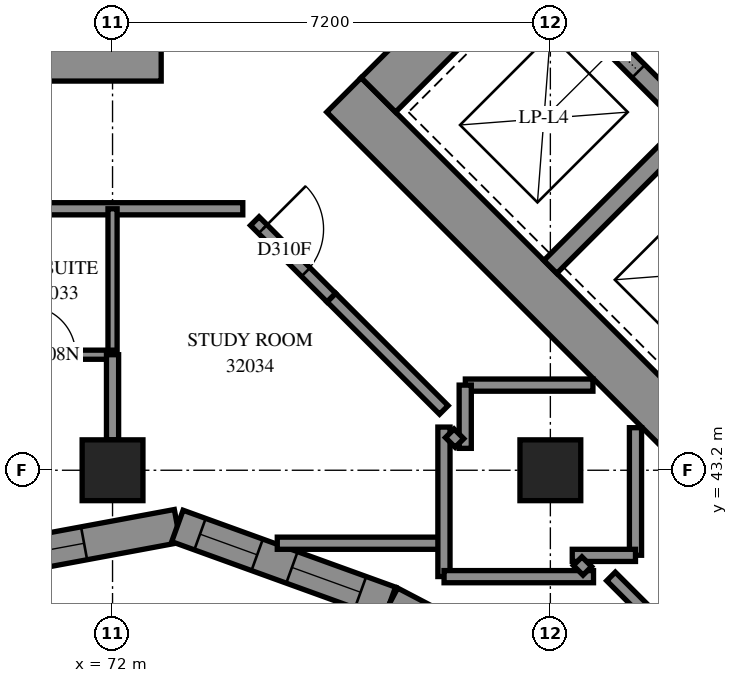
"""IFC4 building model, lengths in metres.
Left out: names, types, materials, properties, quantities, classifications, styles, units other than length and angle.
Written with IfcOpenShell. Run it as: python <this file> out.ifc"""

import sys

from ifc_helpers import new_model, si_unit, direction, frame, frame_2d, origin, origin_2d, place, context, subcontext, project, spatial, polyline, rectangle, outline, extrude, element, fill, save


model = new_model("IFC4")
c1 = context("Model", 3, precision=1e-05, world=origin(), true_north=direction((0.0, 1.0)))
c2 = subcontext(c1, "Body", "Model", "MODEL_VIEW")
j1 = project(units=[si_unit("LENGTHUNIT", "METRE"), si_unit("PLANEANGLEUNIT", "RADIAN")], contexts=[c1])
p1 = place(None, origin())
s1 = spatial("IfcSite", under=j1, at=p1, CompositionType="ELEMENT")
p2 = place(p1, origin())
s2 = spatial("IfcBuilding", under=s1, at=p2, CompositionType="ELEMENT")
p3 = place(p2, frame((0.0, 0.0, 118.6)))
s3 = spatial("IfcBuildingStorey", under=s2, at=p3, CompositionType="ELEMENT", Elevation=118.6)
for number, where, z_axis, x_axis in (
    (1, (72.0, 43.2, 0.0), (0.0, 0.0, 1.0), (1.0, 0.0, 0.0)),
    (2, (79.2, 43.2, 0.0), (0.0, 0.0, 1.0), (1.0, 0.0, 0.0)),
):
    element("IfcColumn", number, at=place(p3, frame(where, z_axis=z_axis, x_axis=x_axis)), inside=s3, PredefinedType="COLUMN", context=c2, shape_type="SweptSolid", body=[
        extrude(rectangle(XDim=1.0, YDim=1.0, at=origin_2d()), origin(), (0.0, 0.0, 1.0), 3.1),
    ])
for number, where, z_axis, x_axis in (
    (3, (56.8, 50.0, -0.3), (0.0, 0.0, 1.0), (1.0, 0.0, 0.0)),
    (4, (75.806, 49.373, -0.3), (0.0, 0.0, 1.0), (0.707, -0.707, 0.0)),
):
    element("IfcWall", number, at=place(p3, frame(where, z_axis=z_axis, x_axis=x_axis)), inside=s3, PredefinedType="SHEAR", context=c2, shape_type="SweptSolid", body=[
        extrude(rectangle(XDim=16.0, YDim=0.8, at=frame_2d((8.0, 0.0))), origin(), (0.0, 0.0, 1.0), 2.7),
    ])
p4 = place(p3, frame((76.372, 49.373, -0.3), z_axis=(0.0, 0.0, 1.0), x_axis=(0.7071067812, 0.7071067812, 0.0)))
e5 = element("IfcWall", 5, at=p4, inside=s3, PredefinedType="SHEAR", context=c2, shape_type="SweptSolid", body=[
    extrude(rectangle(XDim=14.4, YDim=0.8, at=frame_2d((7.2, 0.0))), origin(), (0.0, 0.0, 1.0), 2.7),
])
p5 = place(p4, frame((4.55, 0.0, 0.3)))
e6 = element("IfcOpeningElement", 6, at=p5, cuts=e5, PredefinedType="OPENING", context=c2, shape_type="SweptSolid", body=[
    extrude(rectangle(XDim=1.1, YDim=2.1, at=frame_2d((0.55, 1.05))), frame((0.0, 0.41, 0.0), z_axis=(0.0, -1.0, 0.0), x_axis=(1.0, 0.0, 0.0)), (0.0, 0.0, 1.0), 0.82),
])
p6 = place(p4, frame((11.35, 0.0, 0.3)))
e7 = element("IfcOpeningElement", 7, at=p6, cuts=e5, PredefinedType="OPENING", context=c2, shape_type="SweptSolid", body=[
    extrude(rectangle(XDim=1.1, YDim=2.1, at=frame_2d((0.55, 1.05))), frame((0.0, 0.41, 0.0), z_axis=(0.0, -1.0, 0.0), x_axis=(1.0, 0.0, 0.0)), (0.0, 0.0, 1.0), 0.82),
])
p7 = place(p3, frame((79.2, 46.544, 0.0), z_axis=(0.0, 0.0, 1.0), x_axis=(0.7071219326, 0.7070916295, 0.0)))
e8 = element("IfcWall", 8, at=p7, inside=s3, PredefinedType="SOLIDWALL", context=c2, shape_type="SweptSolid", body=[
    extrude(rectangle(XDim=3.3, YDim=0.3, at=frame_2d((1.65, 0.0))), origin(), (0.0, 0.0, 1.0), 3.1),
])
p8 = place(p3, frame((78.988, 51.423, 0.0), z_axis=(0.0, 0.0, 1.0), x_axis=(0.7071067812, -0.7071067812, 0.0)))
e9 = element("IfcWall", 9, at=p8, inside=s3, PredefinedType="SOLIDWALL", context=c2, shape_type="SweptSolid", body=[
    extrude(rectangle(XDim=14.4, YDim=0.3, at=frame_2d((7.2, 0.0))), origin(), (0.0, 0.0, 1.0), 3.1),
])
p9 = place(p8, frame((1.25, 0.0, 0.0)))
e10 = element("IfcOpeningElement", 10, at=p9, cuts=e9, PredefinedType="OPENING", context=c2, shape_type="SweptSolid", body=[
    extrude(rectangle(XDim=1.1, YDim=2.1, at=frame_2d((0.55, 1.05))), frame((0.0, 0.16, 0.0), z_axis=(0.0, -1.0, 0.0), x_axis=(1.0, 0.0, 0.0)), (0.0, 0.0, 1.0), 0.32),
])
p10 = place(p8, frame((4.85, 0.0, 0.0)))
e11 = element("IfcOpeningElement", 11, at=p10, cuts=e9, PredefinedType="OPENING", context=c2, shape_type="SweptSolid", body=[
    extrude(rectangle(XDim=1.1, YDim=2.1, at=frame_2d((0.55, 1.05))), frame((0.0, 0.16, 0.0), z_axis=(0.0, -1.0, 0.0), x_axis=(1.0, 0.0, 0.0)), (0.0, 0.0, 1.0), 0.32),
])
p11 = place(p8, frame((8.45, 0.0, 0.0)))
e12 = element("IfcOpeningElement", 12, at=p11, cuts=e9, PredefinedType="OPENING", context=c2, shape_type="SweptSolid", body=[
    extrude(rectangle(XDim=1.1, YDim=2.1, at=frame_2d((0.55, 1.05))), frame((0.0, 0.16, 0.0), z_axis=(0.0, -1.0, 0.0), x_axis=(1.0, 0.0, 0.0)), (0.0, 0.0, 1.0), 0.32),
])
p12 = place(p8, frame((12.05, 0.0, 0.0)))
e13 = element("IfcOpeningElement", 13, at=p12, cuts=e9, PredefinedType="OPENING", context=c2, shape_type="SweptSolid", body=[
    extrude(rectangle(XDim=1.1, YDim=2.1, at=frame_2d((0.55, 1.05))), frame((0.0, 0.16, 0.0), z_axis=(0.0, -1.0, 0.0), x_axis=(1.0, 0.0, 0.0)), (0.0, 0.0, 1.0), 0.32),
])
p13 = place(p3, frame((69.637, 41.647, 0.0), z_axis=(0.0, 0.0, 1.0), x_axis=(0.9831675545, 0.1827062117, 0.0)))
e14 = element("IfcWall", 14, at=p13, inside=s3, PredefinedType="SOLIDWALL", context=c2, shape_type="SweptSolid", body=[
    extrude(outline(polyline([(-0.051, -0.275), (3.413, -0.275), (3.563, 0.275), (0.051, 0.275), (-0.051, -0.275)])), origin(), (0.0, 0.0, 1.0), 3.1),
])
p14 = place(p13, frame((0.727, 0.0, 0.5)))
e15 = element("IfcOpeningElement", 15, at=p14, cuts=e14, PredefinedType="OPENING", context=c2, shape_type="SweptSolid", body=[
    extrude(rectangle(XDim=1.2, YDim=2.45, at=frame_2d((0.6, 1.225))), frame((0.0, 0.285, 0.0), z_axis=(0.0, -1.0, 0.0), x_axis=(1.0, 0.0, 0.0)), (0.0, 0.0, 1.0), 0.57),
])
p15 = place(p3, frame((73.067, 42.284, 0.0), z_axis=(0.0, 0.0, 1.0), x_axis=(0.9402976308, -0.3403532953, 0.0)))
e16 = element("IfcWall", 16, at=p15, inside=s3, PredefinedType="SOLIDWALL", context=c2, shape_type="SweptSolid", body=[
    extrude(outline(polyline([(0.075, -0.275), (3.697, -0.275), (3.734, 0.275), (-0.075, 0.275), (0.075, -0.275)])), origin(), (0.0, 0.0, 1.0), 3.1),
])
p16 = place(p15, frame((0.396, 0.0, 0.45)))
e17 = element("IfcOpeningElement", 17, at=p16, cuts=e16, PredefinedType="OPENING", context=c2, shape_type="SweptSolid", body=[
    extrude(rectangle(XDim=1.0, YDim=2.5, at=frame_2d((0.5, 1.25))), frame((0.0, 0.285, 0.0), z_axis=(0.0, -1.0, 0.0), x_axis=(1.0, 0.0, 0.0)), (0.0, 0.0, 1.0), 0.57),
])
p17 = place(p15, frame((2.003, 0.0, 0.5)))
e18 = element("IfcOpeningElement", 18, at=p17, cuts=e16, PredefinedType="OPENING", context=c2, shape_type="SweptSolid", body=[
    extrude(rectangle(XDim=1.2, YDim=2.45, at=frame_2d((0.6, 1.225))), frame((0.0, 0.285, 0.0), z_axis=(0.0, -1.0, 0.0), x_axis=(1.0, 0.0, 0.0)), (0.0, 0.0, 1.0), 0.57),
])
p18 = place(p3, frame((76.561, 41.019, 0.0), z_axis=(0.0, 0.0, 1.0), x_axis=(0.8859460506, -0.4637883089, 0.0)))
e19 = element("IfcWall", 19, at=p18, inside=s3, PredefinedType="SOLIDWALL", context=c2, shape_type="SweptSolid", body=[
    extrude(outline(polyline([(0.019, -0.275), (4.139, -0.275), (4.268, 0.275), (-0.019, 0.275), (0.019, -0.275)])), origin(), (0.0, 0.0, 1.0), 3.1),
])
p19 = place(p18, frame((0.717, 0.0, 0.5)))
e20 = element("IfcOpeningElement", 20, at=p19, cuts=e19, PredefinedType="OPENING", context=c2, shape_type="SweptSolid", body=[
    extrude(rectangle(XDim=1.2, YDim=2.45, at=frame_2d((0.6, 1.225))), frame((0.0, 0.285, 0.0), z_axis=(0.0, -1.0, 0.0), x_axis=(1.0, 0.0, 0.0)), (0.0, 0.0, 1.0), 0.57),
])
p20 = place(p18, frame((2.219, 0.0, 0.5)))
e21 = element("IfcOpeningElement", 21, at=p20, cuts=e19, PredefinedType="OPENING", context=c2, shape_type="SweptSolid", body=[
    extrude(rectangle(XDim=1.2, YDim=2.45, at=frame_2d((0.6, 1.225))), frame((0.0, 0.285, 0.0), z_axis=(0.0, -1.0, 0.0), x_axis=(1.0, 0.0, 0.0)), (0.0, 0.0, 1.0), 0.57),
])
p21 = place(p3, frame((54.7, 47.5, 0.0), z_axis=(0.0, 0.0, 1.0), x_axis=(1.0, 0.0, 0.0)))
e22 = element("IfcWall", 22, at=p21, inside=s3, PredefinedType="PARTITIONING", context=c2, shape_type="SweptSolid", body=[
    extrude(rectangle(XDim=19.442, YDim=0.2, at=frame_2d((9.721, 0.0))), origin(), (0.0, 0.0, 1.0), 3.1),
])
p22 = place(p21, frame((5.2, 0.0, 0.0)))
e23 = element("IfcOpeningElement", 23, at=p22, cuts=e22, PredefinedType="OPENING", context=c2, shape_type="SweptSolid", body=[
    extrude(rectangle(XDim=0.9, YDim=2.1, at=frame_2d((0.45, 1.05))), frame((0.0, 0.11, 0.0), z_axis=(0.0, -1.0, 0.0), x_axis=(1.0, 0.0, 0.0)), (0.0, 0.0, 1.0), 0.22),
])
p23 = place(p21, frame((8.757, 0.0, 0.0)))
e24 = element("IfcOpeningElement", 24, at=p23, cuts=e22, PredefinedType="OPENING", context=c2, shape_type="SweptSolid", body=[
    extrude(rectangle(XDim=0.9, YDim=2.1, at=frame_2d((0.45, 1.05))), frame((0.0, 0.11, 0.0), z_axis=(0.0, -1.0, 0.0), x_axis=(1.0, 0.0, 0.0)), (0.0, 0.0, 1.0), 0.22),
])
p24 = place(p21, frame((14.05, 0.0, 0.0)))
e25 = element("IfcOpeningElement", 25, at=p24, cuts=e22, PredefinedType="OPENING", context=c2, shape_type="SweptSolid", body=[
    extrude(rectangle(XDim=0.9, YDim=2.1, at=frame_2d((0.45, 1.05))), frame((0.0, 0.11, 0.0), z_axis=(0.0, -1.0, 0.0), x_axis=(1.0, 0.0, 0.0)), (0.0, 0.0, 1.0), 0.22),
])
p25 = place(p3, frame((80.197, 41.453, 0.0), z_axis=(0.0, 0.0, 1.0), x_axis=(0.7071067812, -0.7071067812, 0.0)))
e26 = element("IfcWall", 26, at=p25, inside=s3, PredefinedType="PARTITIONING", context=c2, shape_type="SweptSolid", body=[
    extrude(rectangle(XDim=6.488, YDim=0.2, at=frame_2d((3.244, 0.0))), origin(), (0.0, 0.0, 1.0), 3.1),
])
p26 = place(p3, frame((74.709, 42.0, 0.0), z_axis=(0.0, 0.0, 1.0), x_axis=(1.0, 0.0, 0.0)))
e27 = element("IfcWall", 27, at=p26, inside=s3, PredefinedType="PARTITIONING", context=c2, shape_type="SweptSolid", body=[
    extrude(rectangle(XDim=2.741, YDim=0.2, at=frame_2d((1.37, 0.0))), origin(), (0.0, 0.0, 1.0), 3.1),
])
p27 = place(p3, frame((75.598, 46.04, 0.0), z_axis=(0.0, 0.0, 1.0), x_axis=(0.7074891043, -0.7067242512, 0.0)))
e28 = element("IfcWall", 28, at=p27, inside=s3, PredefinedType="PARTITIONING", context=c2, shape_type="SweptSolid", body=[
    extrude(rectangle(XDim=2.615, YDim=0.2, at=frame_2d((1.308, 0.0))), origin(), (0.0, 0.0, 1.0), 3.1),
])
for number, where, z_axis, x_axis in (
    (29, (77.45, 41.452, 0.0), (0.0, 0.0, 1.0), (0.0, 1.0, 0.0)),
    (30, (77.452, 41.45, 0.0), (0.0, 0.0, 1.0), (1.0, 0.0, 0.0)),
):
    element("IfcWall", number, at=place(p3, frame(where, z_axis=z_axis, x_axis=x_axis)), inside=s3, PredefinedType="PARTITIONING", context=c2, shape_type="SweptSolid", body=[
        extrude(rectangle(XDim=2.458, YDim=0.2, at=frame_2d((1.229, 0.0))), origin(), (0.0, 0.0, 1.0), 3.1),
    ])
p28 = place(p3, frame((72.0, 45.1, 0.0), z_axis=(0.0, 0.0, 1.0), x_axis=(0.0, 1.0, 0.0)))
e31 = element("IfcWall", 31, at=p28, inside=s3, PredefinedType="PARTITIONING", context=c2, shape_type="SweptSolid", body=[
    extrude(rectangle(XDim=2.4, YDim=0.15, at=frame_2d((1.2, 0.0))), origin(), (0.0, 0.0, 1.0), 3.1),
])
for number, where, z_axis, x_axis in (
    (32, (77.802, 44.6, 0.0), (0.0, 0.0, 1.0), (1.0, 0.0, 0.0)),
    (33, (80.6, 41.802, 0.0), (0.0, 0.0, 1.0), (0.0, 1.0, 0.0)),
):
    element("IfcWall", number, at=place(p3, frame(where, z_axis=z_axis, x_axis=x_axis)), inside=s3, PredefinedType="PARTITIONING", context=c2, shape_type="SweptSolid", body=[
        extrude(rectangle(XDim=2.098, YDim=0.2, at=frame_2d((1.049, 0.0))), origin(), (0.0, 0.0, 1.0), 3.1),
    ])
p29 = place(p3, frame((70.1, 45.1, 0.0), z_axis=(0.0, 0.0, 1.0), x_axis=(1.0, 0.0, 0.0)))
e34 = element("IfcWall", 34, at=p29, inside=s3, PredefinedType="PARTITIONING", context=c2, shape_type="SweptSolid", body=[
    extrude(rectangle(XDim=1.9, YDim=0.15, at=frame_2d((0.95, 0.0))), origin(), (0.0, 0.0, 1.0), 3.1),
])
p30 = place(p29, frame((0.493, 0.0, 0.0)))
e35 = element("IfcOpeningElement", 35, at=p30, cuts=e34, PredefinedType="OPENING", context=c2, shape_type="SweptSolid", body=[
    extrude(rectangle(XDim=0.8, YDim=2.1, at=frame_2d((0.4, 1.05))), frame((0.0, 0.085, 0.0), z_axis=(0.0, -1.0, 0.0), x_axis=(1.0, 0.0, 0.0)), (0.0, 0.0, 1.0), 0.17),
])
p31 = place(p3, frame((74.339, 47.297, 0.0), z_axis=(0.0, 0.0, 1.0), x_axis=(0.7071067812, -0.7071067812, 0.0)))
e36 = element("IfcWall", 36, at=p31, inside=s3, PredefinedType="PARTITIONING", context=c2, shape_type="SweptSolid", body=[
    extrude(rectangle(XDim=1.779, YDim=0.2, at=frame_2d((0.889, 0.0))), origin(), (0.0, 0.0, 1.0), 3.1),
])
p32 = place(p31, frame((0.186, 0.0, 0.0)))
e37 = element("IfcOpeningElement", 37, at=p32, cuts=e36, PredefinedType="OPENING", context=c2, shape_type="SweptSolid", body=[
    extrude(rectangle(XDim=1.0, YDim=2.1, at=frame_2d((0.5, 1.05))), frame((0.0, 0.11, 0.0), z_axis=(0.0, -1.0, 0.0), x_axis=(1.0, 0.0, 0.0)), (0.0, 0.0, 1.0), 0.22),
])
p33 = place(p3, frame((72.0, 43.7, 0.0), z_axis=(0.0, 0.0, 1.0), x_axis=(0.0, 1.0, 0.0)))
e38 = element("IfcWall", 38, at=p33, inside=s3, PredefinedType="PARTITIONING", context=c2, shape_type="SweptSolid", body=[
    extrude(rectangle(XDim=1.4, YDim=0.2, at=frame_2d((0.7, 0.0))), origin(), (0.0, 0.0, 1.0), 3.1),
])
for number, where, z_axis, x_axis in (
    (39, (77.8, 43.56, 0.0), (0.0, 0.0, 1.0), (0.0, 1.0, 0.0)),
    (40, (79.56, 41.8, 0.0), (0.0, 0.0, 1.0), (1.0, 0.0, 0.0)),
):
    element("IfcWall", number, at=place(p3, frame(where, z_axis=z_axis, x_axis=x_axis)), inside=s3, PredefinedType="PARTITIONING", context=c2, shape_type="SweptSolid", body=[
        extrude(rectangle(XDim=1.04, YDim=0.2, at=frame_2d((0.52, 0.0))), origin(), (0.0, 0.0, 1.0), 3.1),
    ])
for number, where, z_axis, x_axis in (
    (41, (79.649, 41.705, 0.0), (0.0, 0.0, 1.0), (0.707, -0.707, 0.0)),
    (42, (77.546, 43.808, 0.0), (0.0, 0.0, 1.0), (0.707, -0.707, 0.0)),
):
    element("IfcWall", number, at=place(p3, frame(where, z_axis=z_axis, x_axis=x_axis)), inside=s3, PredefinedType="PARTITIONING", context=c2, shape_type="SweptSolid", body=[
        extrude(rectangle(XDim=0.225, YDim=0.2, at=frame_2d((0.112, 0.0))), origin(), (0.0, 0.0, 1.0), 3.1),
    ])
p34 = place(p14, origin())
e43 = element("IfcWindow", 43, at=p34, inside=s3, PartitioningType="SINGLE_PANEL", PredefinedType="WINDOW", context=c2, shape_type="SweptSolid", body=[
    extrude(rectangle(XDim=1.2, YDim=2.45, at=frame_2d((0.6, 1.225))), frame((0.0, 0.155, 0.0), z_axis=(0.0, -1.0, 0.0), x_axis=(1.0, 0.0, 0.0)), (0.0, 0.0, 1.0), 0.06),
])
fill(e15, e43)
p35 = place(p9, origin())
e44 = element("IfcDoor", 44, at=p35, inside=s3, OperationType="SLIDING_TO_LEFT", PredefinedType="DOOR", context=c2, shape_type="SweptSolid", body=[
    extrude(rectangle(XDim=1.1, YDim=2.1, at=frame_2d((0.55, 1.05))), frame((0.0, 0.025, 0.0), z_axis=(0.0, -1.0, 0.0), x_axis=(1.0, 0.0, 0.0)), (0.0, 0.0, 1.0), 0.05),
])
fill(e10, e44)
p36 = place(p30, origin())
e45 = element("IfcDoor", 45, at=p36, inside=s3, OperationType="SINGLE_SWING_RIGHT", PredefinedType="DOOR", context=c2, shape_type="SweptSolid", body=[
    extrude(rectangle(XDim=0.8, YDim=2.1, at=frame_2d((0.4, 1.05))), frame((0.0, 0.025, 0.0), z_axis=(0.0, -1.0, 0.0), x_axis=(1.0, 0.0, 0.0)), (0.0, 0.0, 1.0), 0.05),
])
fill(e35, e45)
p37 = place(p32, origin())
e46 = element("IfcDoor", 46, at=p37, inside=s3, OperationType="SINGLE_SWING_LEFT", PredefinedType="DOOR", context=c2, shape_type="SweptSolid", body=[
    extrude(rectangle(XDim=1.0, YDim=2.1, at=frame_2d((0.5, 1.05))), frame((0.0, 0.025, 0.0), z_axis=(0.0, -1.0, 0.0), x_axis=(1.0, 0.0, 0.0)), (0.0, 0.0, 1.0), 0.05),
])
fill(e37, e46)
p38 = place(p16, origin())
e47 = element("IfcWindow", 47, at=p38, inside=s3, PartitioningType="SINGLE_PANEL", PredefinedType="WINDOW", context=c2, shape_type="SweptSolid", body=[
    extrude(rectangle(XDim=1.0, YDim=2.5, at=frame_2d((0.5, 1.25))), frame((0.0, 0.155, 0.0), z_axis=(0.0, -1.0, 0.0), x_axis=(1.0, 0.0, 0.0)), (0.0, 0.0, 1.0), 0.06),
])
fill(e17, e47)
p39 = place(p17, origin())
e48 = element("IfcWindow", 48, at=p39, inside=s3, PartitioningType="SINGLE_PANEL", PredefinedType="WINDOW", context=c2, shape_type="SweptSolid", body=[
    extrude(rectangle(XDim=1.2, YDim=2.45, at=frame_2d((0.6, 1.225))), frame((0.0, 0.155, 0.0), z_axis=(0.0, -1.0, 0.0), x_axis=(1.0, 0.0, 0.0)), (0.0, 0.0, 1.0), 0.06),
])
fill(e18, e48)
save(model, sys.argv[1])
